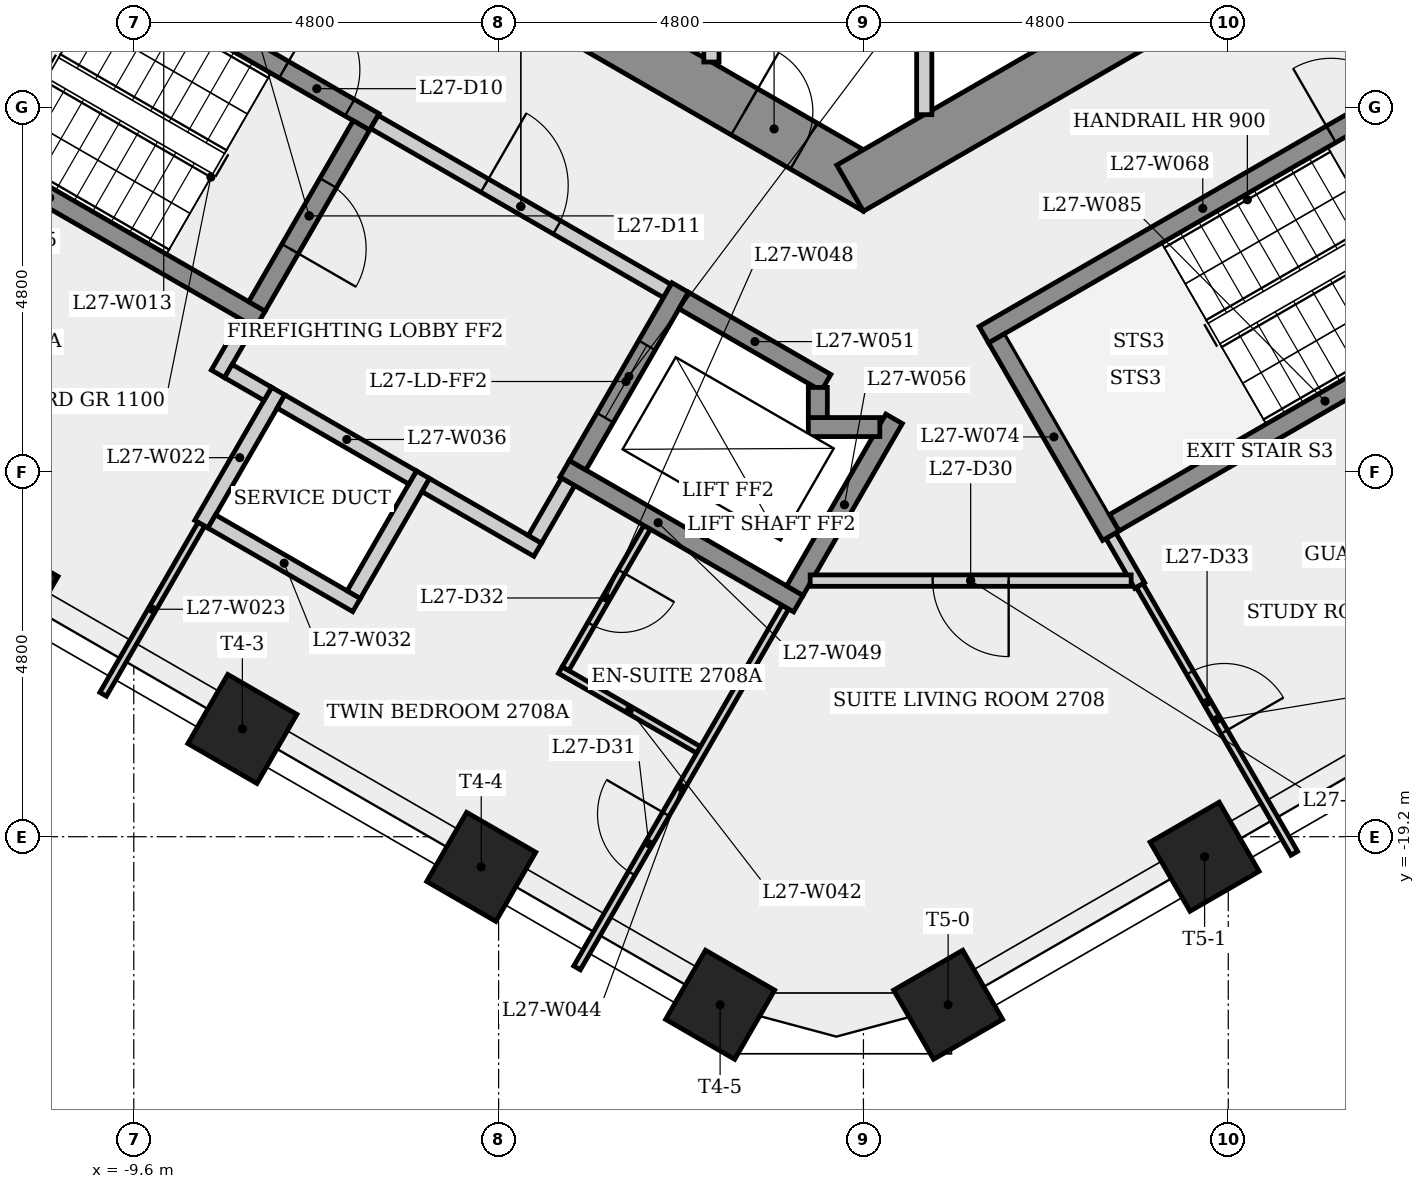
"""IFC4 building model, lengths in metres.
Left out: names, types, materials, properties, quantities, classifications, styles, units other than length and angle.
Written with IfcOpenShell. Run it as: python <this file> out.ifc"""

import sys

from ifc_helpers import new_model, si_unit, direction, frame, frame_2d, origin, origin_2d, place, context, subcontext, project, spatial, rectangle, extrude, element, fill, save


model = new_model("IFC4")
c1 = context("Model", 3, precision=1e-05, world=origin(), true_north=direction((0.0, 1.0)))
c2 = subcontext(c1, "Body", "Model", "MODEL_VIEW")
j1 = project(units=[si_unit("LENGTHUNIT", "METRE"), si_unit("PLANEANGLEUNIT", "RADIAN")], contexts=[c1])
p1 = place(None, origin())
s1 = spatial("IfcSite", under=j1, at=p1, CompositionType="ELEMENT")
p2 = place(p1, origin())
s2 = spatial("IfcBuilding", under=s1, at=p2, CompositionType="ELEMENT")
p3 = place(p2, frame((0.0, 0.0, 103.5)))
s3 = spatial("IfcBuildingStorey", under=s2, at=p3, CompositionType="ELEMENT", Elevation=103.5)
p4 = place(p3, frame((-9.325, -5.182, 0.0), z_axis=(0.0, 0.0, 1.0), x_axis=(0.866023993627, -0.500002442456, 0.0)))
e1 = element("IfcWall", 1, at=p4, inside=s3, PredefinedType="SHEAR", context=c2, shape_type="SweptSolid", body=[
    extrude(rectangle(XDim=10.97, YDim=0.7, at=frame_2d((5.485, 0.0))), origin(), (0.0, 0.0, 1.0), 3.4),
])
p5 = place(p4, frame((2.239, 0.0, 0.0)))
e2 = element("IfcOpeningElement", 2, at=p5, cuts=e1, PredefinedType="OPENING", context=c2, shape_type="SweptSolid", body=[
    extrude(rectangle(XDim=0.9, YDim=2.1, at=frame_2d((0.45, 1.05))), frame((0.0, 0.36, 0.0), z_axis=(0.0, -1.0, 0.0), x_axis=(1.0, 0.0, 0.0)), (0.0, 0.0, 1.0), 0.72),
])
p6 = place(p4, frame((8.96, 0.0, 0.0)))
e3 = element("IfcOpeningElement", 3, at=p6, cuts=e1, PredefinedType="OPENING", context=c2, shape_type="SweptSolid", body=[
    extrude(rectangle(XDim=0.9, YDim=2.1, at=frame_2d((0.45, 1.05))), frame((0.0, 0.36, 0.0), z_axis=(0.0, -1.0, 0.0), x_axis=(1.0, 0.0, 0.0)), (0.0, 0.0, 1.0), 0.72),
])
p7 = place(p3, frame((-0.175, -10.667, 0.0), z_axis=(0.0, 0.0, 1.0), x_axis=(0.866023993627, 0.500002442456, 0.0)))
e4 = element("IfcWall", 4, at=p7, inside=s3, PredefinedType="SHEAR", context=c2, shape_type="SweptSolid", body=[
    extrude(rectangle(XDim=10.97, YDim=0.7, at=frame_2d((5.485, 0.0))), origin(), (0.0, 0.0, 1.0), 3.4),
])
p8 = place(p7, frame((7.137, 0.0, 0.0)))
e5 = element("IfcOpeningElement", 5, at=p8, cuts=e4, PredefinedType="OPENING", context=c2, shape_type="SweptSolid", body=[
    extrude(rectangle(XDim=0.9, YDim=2.1, at=frame_2d((0.45, 1.05))), frame((0.0, 0.36, 0.0), z_axis=(0.0, -1.0, 0.0), x_axis=(1.0, 0.0, 0.0)), (0.0, 0.0, 1.0), 0.72),
])
for number, where, z_axis, x_axis in (
    (6, (-11.314, -15.968, 0.0), (0.0, 0.0, 1.0), (-0.5, -0.866, 0.0)),
    (7, (-8.171, -17.782, 0.0), (0.0, 0.0, 1.0), (-0.5, -0.866, 0.0)),
    (8, (-5.029, -19.597, 0.0), (0.0, 0.0, 1.0), (-0.5, -0.866, 0.0)),
    (9, (-1.886, -21.411, 0.0), (0.0, 0.0, 1.0), (-0.5, -0.866, 0.0)),
    (10, (1.114, -21.411, 0.0), (0.0, 0.0, 1.0), (0.5, -0.866, 0.0)),
    (11, (4.489, -19.463, 0.0), (0.0, 0.0, 1.0), (0.5, -0.866, 0.0)),
):
    element("IfcColumn", number, at=place(p3, frame(where, z_axis=z_axis, x_axis=x_axis)), inside=s3, PredefinedType="COLUMN", context=c2, shape_type="SweptSolid", body=[
        extrude(rectangle(XDim=1.05, YDim=1.05, at=origin_2d()), origin(), (0.0, 0.0, 1.0), 3.4),
    ])
p9 = place(p3, frame((-11.977, -6.595, 0.0), z_axis=(0.0, 0.0, 1.0), x_axis=(0.866025499775, -0.499999833739, 0.0)))
e12 = element("IfcWall", 12, at=p9, inside=s3, PredefinedType="SHEAR", context=c2, shape_type="SweptSolid", body=[
    extrude(rectangle(XDim=6.4, YDim=0.25, at=frame_2d((3.2, 0.0))), origin(), (0.0, 0.0, 1.0), 3.05),
])
p10 = place(p9, frame((5.025, 0.0, 0.0)))
e13 = element("IfcOpeningElement", 13, at=p10, cuts=e12, PredefinedType="OPENING", context=c2, shape_type="SweptSolid", body=[
    extrude(rectangle(XDim=1.0, YDim=2.1, at=frame_2d((0.5, 1.05))), frame((0.0, 0.135, 0.0), z_axis=(0.0, -1.0, 0.0), x_axis=(1.0, 0.0, 0.0)), (0.0, 0.0, 1.0), 0.27),
])
p11 = place(p3, frame((-8.711, -15.088, 0.0), z_axis=(0.0, 0.0, 1.0), x_axis=(0.500060350025, 0.865990557877, 0.0)))
e14 = element("IfcWall", 14, at=p11, inside=s3, PredefinedType="PLUMBINGWALL", context=c2, shape_type="SweptSolid", body=[
    extrude(rectangle(XDim=2.022, YDim=0.2, at=frame_2d((1.011, 0.0))), origin(), (0.0, 0.0, 1.0), 3.05),
])
p12 = place(p3, frame((-8.711, -15.088, 0.0), z_axis=(0.0, 0.0, 1.0), x_axis=(-0.500030472146, -0.866007809968, 0.0)))
e15 = element("IfcWall", 15, at=p12, inside=s3, PredefinedType="PARTITIONING", context=c2, shape_type="SweptSolid", body=[
    extrude(rectangle(XDim=2.584, YDim=0.1, at=frame_2d((1.292, 0.0))), origin(), (0.0, 0.0, 1.0), 3.05),
])
p13 = place(p3, frame((-8.493, -13.11, 0.0), z_axis=(0.0, 0.0, 1.0), x_axis=(0.500067724834, 0.865986299303, 0.0)))
e16 = element("IfcWall", 16, at=p13, inside=s3, PredefinedType="PARTITIONING", context=c2, shape_type="SweptSolid", body=[
    extrude(rectangle(XDim=0.775, YDim=0.2, at=frame_2d((0.388, 0.0))), origin(), (0.0, 0.0, 1.0), 3.05),
])
p14 = place(p3, frame((-7.935, -12.393, 0.0), z_axis=(0.0, 0.0, 1.0), x_axis=(-0.866025499775, 0.499999833739, 0.0)))
e17 = element("IfcWall", 17, at=p14, inside=s3, PredefinedType="SHEAR", context=c2, shape_type="SweptSolid", body=[
    extrude(rectangle(XDim=6.4, YDim=0.25, at=frame_2d((3.2, 0.0))), origin(), (0.0, 0.0, 1.0), 3.05),
])
p15 = place(p3, frame((-7.836, -13.373, 0.0), z_axis=(0.0, 0.0, 1.0), x_axis=(-0.866232998003, 0.499640263761, 0.0)))
e18 = element("IfcWall", 18, at=p15, inside=s3, PredefinedType="PARTITIONING", context=c2, shape_type="SweptSolid", body=[
    extrude(rectangle(XDim=0.6, YDim=0.2, at=frame_2d((0.3, 0.0))), origin(), (0.0, 0.0, 1.0), 3.05),
])
p16 = place(p3, frame((-6.669, -16.152, 0.0), z_axis=(0.0, 0.0, 1.0), x_axis=(-0.866035918664, 0.499981787252, 0.0)))
e19 = element("IfcWall", 19, at=p16, inside=s3, PredefinedType="PLUMBINGWALL", context=c2, shape_type="SweptSolid", body=[
    extrude(rectangle(XDim=2.2, YDim=0.2, at=frame_2d((1.1, 0.0))), origin(), (0.0, 0.0, 1.0), 3.05),
])
p17 = place(p3, frame((-6.605, -9.841, 0.0), z_axis=(0.0, 0.0, 1.0), x_axis=(-0.499996545922, -0.866027397988, 0.0)))
e20 = element("IfcWall", 20, at=p17, inside=s3, PredefinedType="SHEAR", context=c2, shape_type="SweptSolid", body=[
    extrude(rectangle(XDim=2.75, YDim=0.25, at=frame_2d((1.375, 0.0))), origin(), (0.0, 0.0, 1.0), 3.05),
])
p18 = place(p17, frame((0.875, 0.0, 0.0)))
e21 = element("IfcOpeningElement", 21, at=p18, cuts=e20, PredefinedType="OPENING", context=c2, shape_type="SweptSolid", body=[
    extrude(rectangle(XDim=1.0, YDim=2.1, at=frame_2d((0.5, 1.05))), frame((0.0, 0.135, 0.0), z_axis=(0.0, -1.0, 0.0), x_axis=(1.0, 0.0, 0.0)), (0.0, 0.0, 1.0), 0.27),
])
p19 = place(p3, frame((-6.435, -9.795, 0.0), z_axis=(0.0, 0.0, 1.0), x_axis=(0.866012907634, -0.500021643343, 0.0)))
e22 = element("IfcWall", 22, at=p19, inside=s3, PredefinedType="PARTITIONING", context=c2, shape_type="SweptSolid", body=[
    extrude(rectangle(XDim=4.45, YDim=0.2, at=frame_2d((2.225, 0.0))), origin(), (0.0, 0.0, 1.0), 3.05),
])
p20 = place(p19, frame((1.675, 0.0, 0.0)))
e23 = element("IfcOpeningElement", 23, at=p20, cuts=e22, PredefinedType="OPENING", context=c2, shape_type="SweptSolid", body=[
    extrude(rectangle(XDim=1.1, YDim=2.1, at=frame_2d((0.55, 1.05))), frame((0.0, 0.11, 0.0), z_axis=(0.0, -1.0, 0.0), x_axis=(1.0, 0.0, 0.0)), (0.0, 0.0, 1.0), 0.22),
])
p21 = place(p3, frame((-5.795, -14.437, 0.0), z_axis=(0.0, 0.0, 1.0), x_axis=(-0.500000789788, -0.8660249478, 0.0)))
e24 = element("IfcWall", 24, at=p21, inside=s3, PredefinedType="PLUMBINGWALL", context=c2, shape_type="SweptSolid", body=[
    extrude(rectangle(XDim=1.822, YDim=0.2, at=frame_2d((0.911, 0.0))), origin(), (0.0, 0.0, 1.0), 3.05),
])
p22 = place(p3, frame((-5.931, -14.473, 0.0), z_axis=(0.0, 0.0, 1.0), x_axis=(-0.866041268327, 0.499972520799, 0.0)))
e25 = element("IfcWall", 25, at=p22, inside=s3, PredefinedType="PLUMBINGWALL", context=c2, shape_type="SweptSolid", body=[
    extrude(rectangle(XDim=2.0, YDim=0.2, at=frame_2d((1.0, 0.0))), origin(), (0.0, 0.0, 1.0), 3.05),
])
p23 = place(p3, frame((-4.286, -15.423, 0.0), z_axis=(0.0, 0.0, 1.0), x_axis=(-0.866025371046, 0.500000056704, 0.0)))
e26 = element("IfcWall", 26, at=p23, inside=s3, PredefinedType="PARTITIONING", context=c2, shape_type="SweptSolid", body=[
    extrude(rectangle(XDim=1.7, YDim=0.2, at=frame_2d((0.85, 0.0))), origin(), (0.0, 0.0, 1.0), 3.05),
])
p24 = place(p3, frame((-3.988, -17.007, 0.0), z_axis=(0.0, 0.0, 1.0), x_axis=(0.866059744384, -0.49994051562, 0.0)))
e27 = element("IfcWall", 27, at=p24, inside=s3, PredefinedType="PARTITIONING", context=c2, shape_type="SweptSolid", body=[
    extrude(rectangle(XDim=2.1, YDim=0.1, at=frame_2d((1.05, 0.0))), origin(), (0.0, 0.0, 1.0), 3.05),
])
p25 = place(p3, frame((-3.885, -14.529, 0.0), z_axis=(0.0, 0.0, 1.0), x_axis=(-0.499859285417, -0.866106630146, 0.0)))
e28 = element("IfcWall", 28, at=p25, inside=s3, PredefinedType="PARTITIONING", context=c2, shape_type="SweptSolid", body=[
    extrude(rectangle(XDim=0.875, YDim=0.2, at=frame_2d((0.438, 0.0))), origin(), (0.0, 0.0, 1.0), 3.05),
])
p26 = place(p3, frame((-3.768, -20.926, 0.0), z_axis=(0.0, 0.0, 1.0), x_axis=(0.499980760091, 0.866036511666, 0.0)))
e29 = element("IfcWall", 29, at=p26, inside=s3, PredefinedType="PARTITIONING", context=c2, shape_type="SweptSolid", body=[
    extrude(rectangle(XDim=5.482, YDim=0.1, at=frame_2d((2.741, 0.0))), origin(), (0.0, 0.0, 1.0), 3.05),
])
p27 = place(p26, frame((1.438, 0.0, 0.0)))
e30 = element("IfcOpeningElement", 30, at=p27, cuts=e29, PredefinedType="OPENING", context=c2, shape_type="SweptSolid", body=[
    extrude(rectangle(XDim=0.9, YDim=2.1, at=frame_2d((0.45, 1.05))), frame((0.0, 0.06, 0.0), z_axis=(0.0, -1.0, 0.0), x_axis=(1.0, 0.0, 0.0)), (0.0, 0.0, 1.0), 0.12),
])
p28 = place(p3, frame((-2.846, -15.129, 0.0), z_axis=(0.0, 0.0, 1.0), x_axis=(-0.499978313311, -0.866037924238, 0.0)))
e31 = element("IfcWall", 31, at=p28, inside=s3, PredefinedType="PARTITIONING", context=c2, shape_type="SweptSolid", body=[
    extrude(rectangle(XDim=2.147, YDim=0.1, at=frame_2d((1.074, 0.0))), origin(), (0.0, 0.0, 1.0), 3.05),
])
p29 = place(p28, frame((0.674, 0.0, 0.0)))
e32 = element("IfcOpeningElement", 32, at=p29, cuts=e31, PredefinedType="OPENING", context=c2, shape_type="SweptSolid", body=[
    extrude(rectangle(XDim=0.8, YDim=2.1, at=frame_2d((0.4, 1.05))), frame((0.0, 0.06, 0.0), z_axis=(0.0, -1.0, 0.0), x_axis=(1.0, 0.0, 0.0)), (0.0, 0.0, 1.0), 0.12),
])
p30 = place(p3, frame((-3.931, -14.358, 0.0), z_axis=(0.0, 0.0, 1.0), x_axis=(0.8660424351, -0.499970499736, 0.0)))
e33 = element("IfcWall", 33, at=p30, inside=s3, PredefinedType="SHEAR", context=c2, shape_type="SweptSolid", body=[
    extrude(rectangle(XDim=3.55, YDim=0.25, at=frame_2d((1.775, 0.0))), origin(), (0.0, 0.0, 1.0), 3.05),
])
p31 = place(p3, frame((-2.41, -11.974, 0.0), z_axis=(0.0, 0.0, 1.0), x_axis=(-0.50000943426, -0.866019956843, 0.0)))
e34 = element("IfcWall", 34, at=p31, inside=s3, PredefinedType="SHEAR", context=c2, shape_type="SweptSolid", body=[
    extrude(rectangle(XDim=2.7, YDim=0.25, at=frame_2d((1.35, 0.0))), origin(), (0.0, 0.0, 1.0), 3.05),
])
p32 = place(p31, frame((0.877, 0.0, 0.0)))
e35 = element("IfcOpeningElement", 35, at=p32, cuts=e34, PredefinedType="OPENING", context=c2, shape_type="SweptSolid", body=[
    extrude(rectangle(XDim=1.1, YDim=2.1, at=frame_2d((0.55, 1.05))), frame((0.0, 0.135, 0.0), z_axis=(0.0, -1.0, 0.0), x_axis=(1.0, 0.0, 0.0)), (0.0, 0.0, 1.0), 0.27),
])
p33 = place(p3, frame((-2.364, -12.145, 0.0), z_axis=(0.0, 0.0, 1.0), x_axis=(0.86603892542, -0.499976579108, 0.0)))
e36 = element("IfcWall", 36, at=p33, inside=s3, PredefinedType="SHEAR", context=c2, shape_type="SweptSolid", body=[
    extrude(rectangle(XDim=2.162, YDim=0.25, at=frame_2d((1.081, 0.0))), origin(), (0.0, 0.0, 1.0), 3.05),
])
p34 = place(p3, frame((-2.0, -5.275, 0.0), z_axis=(0.0, 0.0, 1.0), x_axis=(0.0, -1.0, 0.0)))
e37 = element("IfcWall", 37, at=p34, inside=s3, PredefinedType="PARTITIONING", context=c2, shape_type="SweptSolid", body=[
    extrude(rectangle(XDim=3.732, YDim=0.2, at=frame_2d((1.866, 0.0))), origin(), (0.0, 0.0, 1.0), 3.05),
])
p35 = place(p3, frame((-0.902, -15.962, 0.0), z_axis=(0.0, 0.0, 1.0), x_axis=(0.499981517636, 0.866036074319, 0.0)))
e38 = element("IfcWall", 38, at=p35, inside=s3, PredefinedType="SHEAR", context=c2, shape_type="SweptSolid", body=[
    extrude(rectangle(XDim=2.61, YDim=0.25, at=frame_2d((1.305, 0.0))), origin(), (0.0, 0.0, 1.0), 3.05),
])
p36 = place(p3, frame((-0.725, -13.81, 0.0), z_axis=(0.0, 0.0, 1.0), x_axis=(1.0, 0.0, 0.0)))
e39 = element("IfcWall", 39, at=p36, inside=s3, PredefinedType="SHEAR", context=c2, shape_type="SweptSolid", body=[
    extrude(rectangle(XDim=0.941, YDim=0.25, at=frame_2d((0.47, 0.0))), origin(), (0.0, 0.0, 1.0), 3.4),
])
p37 = place(p3, frame((-0.6, -13.289, 0.0), z_axis=(0.0, 0.0, 1.0), x_axis=(0.0, -1.0, 0.0)))
e40 = element("IfcWall", 40, at=p37, inside=s3, PredefinedType="SHEAR", context=c2, shape_type="SweptSolid", body=[
    extrude(rectangle(XDim=0.396, YDim=0.25, at=frame_2d((0.198, 0.0))), origin(), (0.0, 0.0, 1.0), 3.4),
])
p38 = place(p3, frame((0.8, -5.275, 0.0), z_axis=(0.0, 0.0, 1.0), x_axis=(0.0, -1.0, 0.0)))
e41 = element("IfcWall", 41, at=p38, inside=s3, PredefinedType="PARTITIONING", context=c2, shape_type="SweptSolid", body=[
    extrude(rectangle(XDim=4.425, YDim=0.2, at=frame_2d((2.212, 0.0))), origin(), (0.0, 0.0, 1.0), 3.05),
])
p39 = place(p3, frame((1.585, -12.595, 0.0), z_axis=(0.0, 0.0, 1.0), x_axis=(0.866036417653, 0.499980922934, 0.0)))
e42 = element("IfcWall", 42, at=p39, inside=s3, PredefinedType="SHEAR", context=c2, shape_type="SweptSolid", body=[
    extrude(rectangle(XDim=6.65, YDim=0.25, at=frame_2d((3.325, 0.0))), origin(), (0.0, 0.0, 1.0), 3.05),
])
p40 = place(p39, frame((5.275, 0.0, 0.0)))
e43 = element("IfcOpeningElement", 43, at=p40, cuts=e42, PredefinedType="OPENING", context=c2, shape_type="SweptSolid", body=[
    extrude(rectangle(XDim=1.0, YDim=2.1, at=frame_2d((0.5, 1.05))), frame((0.0, 0.135, 0.0), z_axis=(0.0, -1.0, 0.0), x_axis=(1.0, 0.0, 0.0)), (0.0, 0.0, 1.0), 0.27),
])
p41 = place(p3, frame((3.256, -15.239, 0.0), z_axis=(0.0, 0.0, 1.0), x_axis=(0.49988045057, -0.866094414679, 0.0)))
e44 = element("IfcWall", 44, at=p41, inside=s3, PredefinedType="PARTITIONING", context=c2, shape_type="SweptSolid", body=[
    extrude(rectangle(XDim=0.758, YDim=0.15, at=frame_2d((0.379, 0.0))), origin(), (0.0, 0.0, 1.0), 3.05),
])
p42 = place(p3, frame((3.256, -15.239, 0.0), z_axis=(0.0, 0.0, 1.0), x_axis=(-0.50002537861, 0.866010750942, 0.0)))
e45 = element("IfcWall", 45, at=p42, inside=s3, PredefinedType="SHEAR", context=c2, shape_type="SweptSolid", body=[
    extrude(rectangle(XDim=3.0, YDim=0.25, at=frame_2d((1.5, 0.0))), origin(), (0.0, 0.0, 1.0), 3.05),
])
p43 = place(p3, frame((3.522, -15.83, 0.0), z_axis=(0.0, 0.0, 1.0), x_axis=(-1.0, 0.0, 0.0)))
e46 = element("IfcWall", 46, at=p43, inside=s3, PredefinedType="PARTITIONING", context=c2, shape_type="SweptSolid", body=[
    extrude(rectangle(XDim=4.223, YDim=0.15, at=frame_2d((2.111, 0.0))), origin(), (0.0, 0.0, 1.0), 3.05),
])
p44 = place(p43, frame((1.611, 0.0, 0.0)))
e47 = element("IfcOpeningElement", 47, at=p44, cuts=e46, PredefinedType="OPENING", context=c2, shape_type="SweptSolid", body=[
    extrude(rectangle(XDim=1.0, YDim=2.1, at=frame_2d((0.5, 1.05))), frame((0.0, 0.085, 0.0), z_axis=(0.0, -1.0, 0.0), x_axis=(1.0, 0.0, 0.0)), (0.0, 0.0, 1.0), 0.17),
])
p45 = place(p3, frame((3.635, -15.895, 0.0), z_axis=(0.0, 0.0, 1.0), x_axis=(0.499999564052, -0.866025655479, 0.0)))
e48 = element("IfcWall", 48, at=p45, inside=s3, PredefinedType="PARTITIONING", context=c2, shape_type="SweptSolid", body=[
    extrude(rectangle(XDim=4.067, YDim=0.1, at=frame_2d((2.034, 0.0))), origin(), (0.0, 0.0, 1.0), 3.05),
])
p46 = place(p45, frame((1.323, 0.0, 0.0)))
e49 = element("IfcOpeningElement", 49, at=p46, cuts=e48, PredefinedType="OPENING", context=c2, shape_type="SweptSolid", body=[
    extrude(rectangle(XDim=0.9, YDim=2.1, at=frame_2d((0.45, 1.05))), frame((0.0, 0.06, 0.0), z_axis=(0.0, -1.0, 0.0), x_axis=(1.0, 0.0, 0.0)), (0.0, 0.0, 1.0), 0.12),
])
p47 = place(p3, frame((3.301, -15.068, 0.0), z_axis=(0.0, 0.0, 1.0), x_axis=(0.866035036182, 0.499983315828, 0.0)))
e50 = element("IfcWall", 50, at=p47, inside=s3, PredefinedType="SHEAR", context=c2, shape_type="SweptSolid", body=[
    extrude(rectangle(XDim=6.4, YDim=0.25, at=frame_2d((3.2, 0.0))), origin(), (0.0, 0.0, 1.0), 3.05),
])
p48 = place(p10, origin())
e51 = element("IfcDoor", 51, at=p48, inside=s3, OperationType="SINGLE_SWING_LEFT", PredefinedType="DOOR", context=c2, shape_type="SweptSolid", body=[
    extrude(rectangle(XDim=1.0, YDim=2.1, at=frame_2d((0.5, 1.05))), frame((0.0, 0.025, 0.0), z_axis=(0.0, -1.0, 0.0), x_axis=(1.0, 0.0, 0.0)), (0.0, 0.0, 1.0), 0.05),
])
fill(e13, e51)
p49 = place(p18, origin())
e52 = element("IfcDoor", 52, at=p49, inside=s3, OperationType="SINGLE_SWING_RIGHT", PredefinedType="DOOR", context=c2, shape_type="SweptSolid", body=[
    extrude(rectangle(XDim=1.0, YDim=2.1, at=frame_2d((0.5, 1.05))), frame((0.0, 0.025, 0.0), z_axis=(0.0, -1.0, 0.0), x_axis=(1.0, 0.0, 0.0)), (0.0, 0.0, 1.0), 0.05),
])
fill(e21, e52)
p50 = place(p20, origin())
e53 = element("IfcDoor", 53, at=p50, inside=s3, OperationType="SINGLE_SWING_LEFT", PredefinedType="DOOR", context=c2, shape_type="SweptSolid", body=[
    extrude(rectangle(XDim=1.1, YDim=2.1, at=frame_2d((0.55, 1.05))), frame((0.0, 0.025, 0.0), z_axis=(0.0, -1.0, 0.0), x_axis=(1.0, 0.0, 0.0)), (0.0, 0.0, 1.0), 0.05),
])
fill(e23, e53)
p51 = place(p32, origin())
e54 = element("IfcDoor", 54, at=p51, inside=s3, OperationType="SLIDING_TO_LEFT", PredefinedType="DOOR", context=c2, shape_type="SweptSolid", body=[
    extrude(rectangle(XDim=1.1, YDim=2.1, at=frame_2d((0.55, 1.05))), frame((0.0, 0.025, 0.0), z_axis=(0.0, -1.0, 0.0), x_axis=(1.0, 0.0, 0.0)), (0.0, 0.0, 1.0), 0.05),
])
fill(e35, e54)
p52 = place(p40, origin())
e55 = element("IfcDoor", 55, at=p52, inside=s3, OperationType="SINGLE_SWING_LEFT", PredefinedType="DOOR", context=c2, shape_type="SweptSolid", body=[
    extrude(rectangle(XDim=1.0, YDim=2.1, at=frame_2d((0.5, 1.05))), frame((0.0, 0.025, 0.0), z_axis=(0.0, -1.0, 0.0), x_axis=(1.0, 0.0, 0.0)), (0.0, 0.0, 1.0), 0.05),
])
fill(e43, e55)
p53 = place(p44, origin())
e56 = element("IfcDoor", 56, at=p53, inside=s3, OperationType="SINGLE_SWING_LEFT", PredefinedType="DOOR", context=c2, shape_type="SweptSolid", body=[
    extrude(rectangle(XDim=1.0, YDim=2.1, at=frame_2d((0.5, 1.05))), frame((0.0, 0.025, 0.0), z_axis=(0.0, -1.0, 0.0), x_axis=(1.0, 0.0, 0.0)), (0.0, 0.0, 1.0), 0.05),
])
fill(e47, e56)
p54 = place(p27, origin())
e57 = element("IfcDoor", 57, at=p54, inside=s3, OperationType="SINGLE_SWING_RIGHT", PredefinedType="DOOR", context=c2, shape_type="SweptSolid", body=[
    extrude(rectangle(XDim=0.9, YDim=2.1, at=frame_2d((0.45, 1.05))), frame((0.0, 0.025, 0.0), z_axis=(0.0, -1.0, 0.0), x_axis=(1.0, 0.0, 0.0)), (0.0, 0.0, 1.0), 0.05),
])
fill(e30, e57)
p55 = place(p29, origin())
e58 = element("IfcDoor", 58, at=p55, inside=s3, OperationType="SINGLE_SWING_LEFT", PredefinedType="DOOR", context=c2, shape_type="SweptSolid", body=[
    extrude(rectangle(XDim=0.8, YDim=2.1, at=frame_2d((0.4, 1.05))), frame((0.0, 0.025, 0.0), z_axis=(0.0, -1.0, 0.0), x_axis=(1.0, 0.0, 0.0)), (0.0, 0.0, 1.0), 0.05),
])
fill(e32, e58)
p56 = place(p46, origin())
e59 = element("IfcDoor", 59, at=p56, inside=s3, OperationType="SINGLE_SWING_RIGHT", PredefinedType="DOOR", context=c2, shape_type="SweptSolid", body=[
    extrude(rectangle(XDim=0.9, YDim=2.1, at=frame_2d((0.45, 1.05))), frame((0.0, 0.025, 0.0), z_axis=(0.0, -1.0, 0.0), x_axis=(1.0, 0.0, 0.0)), (0.0, 0.0, 1.0), 0.05),
])
fill(e49, e59)
p57 = place(p6, origin())
e60 = element("IfcDoor", 60, at=p57, inside=s3, OperationType="SINGLE_SWING_LEFT", PredefinedType="DOOR", context=c2, shape_type="SweptSolid", body=[
    extrude(rectangle(XDim=0.9, YDim=2.1, at=frame_2d((0.45, 1.05))), frame((0.0, 0.025, 0.0), z_axis=(0.0, -1.0, 0.0), x_axis=(1.0, 0.0, 0.0)), (0.0, 0.0, 1.0), 0.05),
])
fill(e3, e60)
save(model, sys.argv[1])
